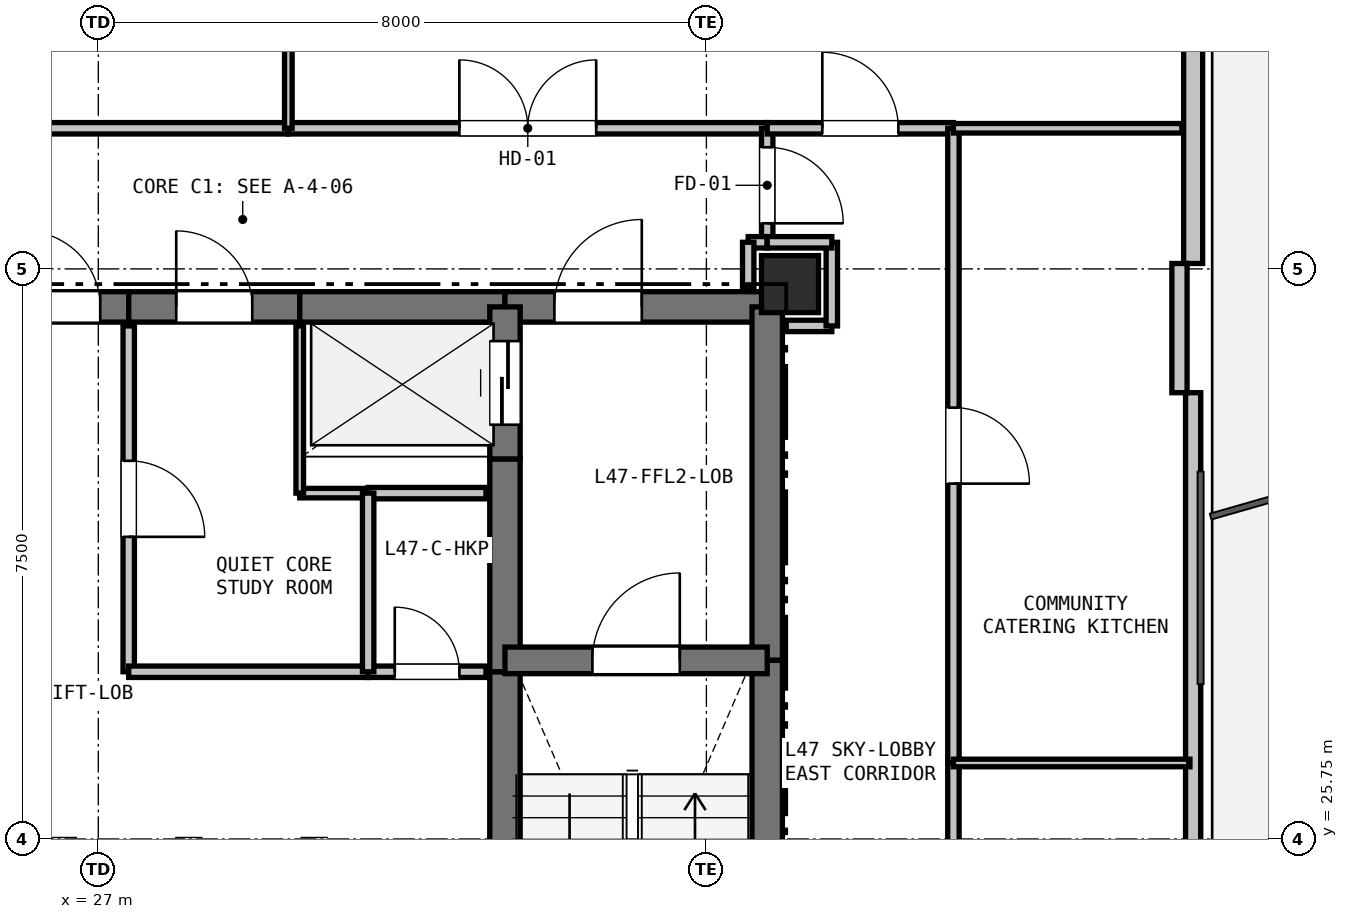
"""IFC4 building model, lengths in metres.
Left out: names, types, materials, properties, quantities, classifications, styles, units other than length and angle.
Written with IfcOpenShell. Run it as: python <this file> out.ifc"""

import sys

from ifc_helpers import new_model, si_unit, direction, frame, frame_2d, origin, origin_2d, place, context, subcontext, project, spatial, rectangle, extrude, element, fill, save


model = new_model("IFC4")
c1 = context("Model", 3, precision=1e-05, world=origin(), true_north=direction((0.0, 1.0)))
c2 = subcontext(c1, "Body", "Model", "MODEL_VIEW")
j1 = project(units=[si_unit("LENGTHUNIT", "METRE"), si_unit("PLANEANGLEUNIT", "RADIAN")], contexts=[c1])
p1 = place(None, origin())
s1 = spatial("IfcSite", under=j1, at=p1, CompositionType="ELEMENT")
p2 = place(p1, origin())
s2 = spatial("IfcBuilding", under=s1, at=p2, CompositionType="ELEMENT")
p3 = place(p2, frame((0.0, 0.0, 170.7)))
s3 = spatial("IfcBuildingStorey", under=s2, at=p3, CompositionType="ELEMENT", Elevation=170.7)
p4 = place(p3, frame((36.1, 33.05, 0.0), z_axis=(0.0, 0.0, 1.0), x_axis=(1.0, 0.0, 0.0)))
e1 = element("IfcColumn", 1, at=p4, inside=s3, PredefinedType="COLUMN", context=c2, shape_type="SweptSolid", body=[
    extrude(rectangle(XDim=0.75, YDim=0.75, at=origin_2d()), origin(), (0.0, 0.0, 1.0), 4.8),
])
p5 = place(p3, frame((18.58, 35.056, 0.0), z_axis=(0.0, 0.0, 1.0), x_axis=(0.866026169916, 0.499998673018, 0.0)))
e2 = element("IfcWall", 2, at=p5, inside=s3, PredefinedType="PARAPET", context=c2, shape_type="SweptSolid", body=[
    extrude(rectangle(XDim=9.742, YDim=0.2, at=frame_2d((4.871, 0.0))), origin(), (0.0, 0.0, 1.0), 0.2),
])
p6 = place(p3, frame((41.404, 43.764, 0.0), z_axis=(0.0, 0.0, 1.0), x_axis=(0.0, -1.0, 0.0)))
e3 = element("IfcWall", 3, at=p6, inside=s3, PredefinedType="SOLIDWALL", context=c2, shape_type="SweptSolid", body=[
    extrude(rectangle(XDim=10.442, YDim=0.25, at=frame_2d((5.221, 0.0))), origin(), (0.0, 0.0, 1.0), 3.205),
])
p7 = place(p6, frame((1.879, 0.0, 0.0)))
e4 = element("IfcOpeningElement", 4, at=p7, cuts=e3, PredefinedType="OPENING", context=c2, shape_type="SweptSolid", body=[
    extrude(rectangle(XDim=1.1, YDim=2.1, at=frame_2d((0.55, 1.05))), frame((0.0, 0.135, 0.0), z_axis=(0.0, -1.0, 0.0), x_axis=(1.0, 0.0, 0.0)), (0.0, 0.0, 1.0), 0.27),
])
p8 = place(p3, frame((41.404, 31.621, 0.0), z_axis=(0.0, 0.0, 1.0), x_axis=(0.0, -1.0, 0.0)))
e5 = element("IfcWall", 5, at=p8, inside=s3, PredefinedType="PARAPET", context=c2, shape_type="SweptSolid", body=[
    extrude(rectangle(XDim=9.742, YDim=0.2, at=frame_2d((4.871, 0.0))), origin(), (0.0, 0.0, 1.0), 0.2),
])
p9 = place(p3, frame((41.224, 33.321, 0.0), z_axis=(0.0, 0.0, 1.0), x_axis=(0.0, -1.0, 0.0)))
e6 = element("IfcWall", 6, at=p9, inside=s3, PredefinedType="PARAPET", context=c2, shape_type="SweptSolid", body=[
    extrude(rectangle(XDim=1.7, YDim=0.2, at=frame_2d((0.85, 0.0))), origin(), (0.0, 0.0, 1.0), 4.19),
])
p10 = place(p3, frame((25.65, 32.75, 0.0), z_axis=(0.0, 0.0, 1.0), x_axis=(1.0, 0.0, 0.0)))
e7 = element("IfcWall", 7, at=p10, inside=s3, PredefinedType="SHEAR", context=c2, shape_type="SweptSolid", body=[
    extrude(rectangle(XDim=1.75, YDim=0.4, at=frame_2d((0.875, 0.0))), origin(), (0.0, 0.0, 1.0), 4.57),
])
p11 = place(p10, frame((0.375, 0.0, 0.0)))
e8 = element("IfcOpeningElement", 8, at=p11, cuts=e7, PredefinedType="OPENING", context=c2, shape_type="SweptSolid", body=[
    extrude(rectangle(XDim=1.0, YDim=2.15, at=frame_2d((0.5, 1.075))), frame((0.0, 0.21, 0.0), z_axis=(0.0, -1.0, 0.0), x_axis=(1.0, 0.0, 0.0)), (0.0, 0.0, 1.0), 0.42),
])
p12 = place(p3, frame((27.4, 32.75, 0.0), z_axis=(0.0, 0.0, 1.0), x_axis=(1.0, 0.0, 0.0)))
e9 = element("IfcWall", 9, at=p12, inside=s3, PredefinedType="SHEAR", context=c2, shape_type="SweptSolid", body=[
    extrude(rectangle(XDim=2.25, YDim=0.4, at=frame_2d((1.125, 0.0))), origin(), (0.0, 0.0, 1.0), 4.57),
])
p13 = place(p12, frame((0.625, 0.0, 0.0)))
e10 = element("IfcOpeningElement", 10, at=p13, cuts=e9, PredefinedType="OPENING", context=c2, shape_type="SweptSolid", body=[
    extrude(rectangle(XDim=1.0, YDim=2.15, at=frame_2d((0.5, 1.075))), frame((0.0, 0.21, 0.0), z_axis=(0.0, -1.0, 0.0), x_axis=(1.0, 0.0, 0.0)), (0.0, 0.0, 1.0), 0.42),
])
p14 = place(p3, frame((29.65, 32.75, 0.0), z_axis=(0.0, 0.0, 1.0), x_axis=(1.0, 0.0, 0.0)))
e11 = element("IfcWall", 11, at=p14, inside=s3, PredefinedType="SHEAR", context=c2, shape_type="SweptSolid", body=[
    extrude(rectangle(XDim=2.7, YDim=0.4, at=frame_2d((1.35, 0.0))), origin(), (0.0, 0.0, 1.0), 4.57),
])
p15 = place(p3, frame((32.35, 32.75, 0.0), z_axis=(0.0, 0.0, 1.0), x_axis=(1.0, 0.0, 0.0)))
e12 = element("IfcWall", 12, at=p15, inside=s3, PredefinedType="SHEAR", context=c2, shape_type="SweptSolid", body=[
    extrude(rectangle(XDim=3.45, YDim=0.4, at=frame_2d((1.725, 0.0))), origin(), (0.0, 0.0, 1.0), 4.57),
])
p16 = place(p15, frame((0.65, 0.0, 0.0)))
e13 = element("IfcOpeningElement", 13, at=p16, cuts=e12, PredefinedType="OPENING", context=c2, shape_type="SweptSolid", body=[
    extrude(rectangle(XDim=1.15, YDim=2.15, at=frame_2d((0.575, 1.075))), frame((0.0, 0.21, 0.0), z_axis=(0.0, -1.0, 0.0), x_axis=(1.0, 0.0, 0.0)), (0.0, 0.0, 1.0), 0.42),
])
p17 = place(p3, frame((35.8, 32.75, 0.0), z_axis=(0.0, 0.0, 1.0), x_axis=(0.0, -1.0, 0.0)))
e14 = element("IfcWall", 14, at=p17, inside=s3, PredefinedType="SHEAR", context=c2, shape_type="SweptSolid", body=[
    extrude(rectangle(XDim=4.65, YDim=0.4, at=frame_2d((2.325, 0.0))), origin(), (0.0, 0.0, 1.0), 4.57),
])
p18 = place(p3, frame((35.8, 28.1, 0.0), z_axis=(0.0, 0.0, 1.0), x_axis=(0.0, -1.0, 0.0)))
e15 = element("IfcWall", 15, at=p18, inside=s3, PredefinedType="SHEAR", context=c2, shape_type="SweptSolid", body=[
    extrude(rectangle(XDim=7.35, YDim=0.4, at=frame_2d((3.675, 0.0))), origin(), (0.0, 0.0, 1.0), 4.57),
])
p19 = place(p3, frame((32.35, 25.55, 0.0), z_axis=(0.0, 0.0, 1.0), x_axis=(0.0, 1.0, 0.0)))
e16 = element("IfcWall", 16, at=p19, inside=s3, PredefinedType="SHEAR", context=c2, shape_type="SweptSolid", body=[
    extrude(rectangle(XDim=2.4, YDim=0.4, at=frame_2d((1.2, 0.0))), origin(), (0.0, 0.0, 1.0), 4.57),
])
p20 = place(p3, frame((32.35, 27.95, 0.0), z_axis=(0.0, 0.0, 1.0), x_axis=(0.0, 1.0, 0.0)))
e17 = element("IfcWall", 17, at=p20, inside=s3, PredefinedType="SHEAR", context=c2, shape_type="SweptSolid", body=[
    extrude(rectangle(XDim=2.8, YDim=0.4, at=frame_2d((1.4, 0.0))), origin(), (0.0, 0.0, 1.0), 4.57),
])
p21 = place(p3, frame((32.35, 30.75, 0.0), z_axis=(0.0, 0.0, 1.0), x_axis=(0.0, 1.0, 0.0)))
e18 = element("IfcWall", 18, at=p21, inside=s3, PredefinedType="SHEAR", context=c2, shape_type="SweptSolid", body=[
    extrude(rectangle(XDim=2.0, YDim=0.4, at=frame_2d((1.0, 0.0))), origin(), (0.0, 0.0, 1.0), 4.57),
])
p22 = place(p21, frame((0.45, 0.0, 0.0)))
e19 = element("IfcOpeningElement", 19, at=p22, cuts=e18, PredefinedType="OPENING", context=c2, shape_type="SweptSolid", body=[
    extrude(rectangle(XDim=1.1, YDim=2.15, at=frame_2d((0.55, 1.075))), frame((0.0, 0.21, 0.0), z_axis=(0.0, -1.0, 0.0), x_axis=(1.0, 0.0, 0.0)), (0.0, 0.0, 1.0), 0.42),
])
p23 = place(p3, frame((32.35, 28.1, 0.0), z_axis=(0.0, 0.0, 1.0), x_axis=(1.0, 0.0, 0.0)))
e20 = element("IfcWall", 20, at=p23, inside=s3, PredefinedType="SHEAR", context=c2, shape_type="SweptSolid", body=[
    extrude(rectangle(XDim=3.45, YDim=0.35, at=frame_2d((1.725, 0.0))), origin(), (0.0, 0.0, 1.0), 4.57),
])
p24 = place(p23, frame((1.15, 0.0, 0.0)))
e21 = element("IfcOpeningElement", 21, at=p24, cuts=e20, PredefinedType="OPENING", context=c2, shape_type="SweptSolid", body=[
    extrude(rectangle(XDim=1.15, YDim=2.15, at=frame_2d((0.575, 1.075))), frame((0.0, 0.185, 0.0), z_axis=(0.0, -1.0, 0.0), x_axis=(1.0, 0.0, 0.0)), (0.0, 0.0, 1.0), 0.37),
])
p25 = place(p3, frame((32.1, 30.3, 0.0), z_axis=(0.0, 0.0, 1.0), x_axis=(-1.0, 0.0, 0.0)))
e22 = element("IfcWall", 22, at=p25, inside=s3, PredefinedType="PARTITIONING", context=c2, shape_type="SweptSolid", body=[
    extrude(rectangle(XDim=1.55, YDim=0.15, at=frame_2d((0.775, 0.0))), origin(), (0.0, 0.0, 1.0), 4.57),
])
p26 = place(p3, frame((30.55, 30.3, 0.0), z_axis=(0.0, 0.0, 1.0), x_axis=(-1.0, 0.0, 0.0)))
e23 = element("IfcWall", 23, at=p26, inside=s3, PredefinedType="PARTITIONING", context=c2, shape_type="SweptSolid", body=[
    extrude(rectangle(XDim=0.9, YDim=0.125, at=frame_2d((0.45, 0.0))), origin(), (0.0, 0.0, 1.0), 4.57),
])
p27 = place(p3, frame((29.65, 30.3, 0.0), z_axis=(0.0, 0.0, 1.0), x_axis=(0.0, 1.0, 0.0)))
e24 = element("IfcWall", 24, at=p27, inside=s3, PredefinedType="PARTITIONING", context=c2, shape_type="SweptSolid", body=[
    extrude(rectangle(XDim=2.2, YDim=0.1, at=frame_2d((1.1, 0.0))), origin(), (0.0, 0.0, 1.0), 4.57),
])
p28 = place(p3, frame((27.4, 32.5, 0.0), z_axis=(0.0, 0.0, 1.0), x_axis=(0.0, -1.0, 0.0)))
e25 = element("IfcWall", 25, at=p28, inside=s3, PredefinedType="PARTITIONING", context=c2, shape_type="SweptSolid", body=[
    extrude(rectangle(XDim=4.55, YDim=0.15, at=frame_2d((2.275, 0.0))), origin(), (0.0, 0.0, 1.0), 4.57),
])
p29 = place(p28, frame((1.775, 0.0, 0.0)))
e26 = element("IfcOpeningElement", 26, at=p29, cuts=e25, PredefinedType="OPENING", context=c2, shape_type="SweptSolid", body=[
    extrude(rectangle(XDim=1.0, YDim=2.15, at=frame_2d((0.5, 1.075))), frame((0.0, 0.085, 0.0), z_axis=(0.0, -1.0, 0.0), x_axis=(1.0, 0.0, 0.0)), (0.0, 0.0, 1.0), 0.17),
])
p30 = place(p3, frame((27.4, 27.95, 0.0), z_axis=(0.0, 0.0, 1.0), x_axis=(1.0, 0.0, 0.0)))
e27 = element("IfcWall", 27, at=p30, inside=s3, PredefinedType="PARTITIONING", context=c2, shape_type="SweptSolid", body=[
    extrude(rectangle(XDim=3.15, YDim=0.15, at=frame_2d((1.575, 0.0))), origin(), (0.0, 0.0, 1.0), 4.57),
])
p31 = place(p3, frame((30.55, 27.95, 0.0), z_axis=(0.0, 0.0, 1.0), x_axis=(1.0, 0.0, 0.0)))
e28 = element("IfcWall", 28, at=p31, inside=s3, PredefinedType="PARTITIONING", context=c2, shape_type="SweptSolid", body=[
    extrude(rectangle(XDim=1.55, YDim=0.15, at=frame_2d((0.775, 0.0))), origin(), (0.0, 0.0, 1.0), 4.57),
])
p32 = place(p31, frame((0.35, 0.0, 0.0)))
e29 = element("IfcOpeningElement", 29, at=p32, cuts=e28, PredefinedType="OPENING", context=c2, shape_type="SweptSolid", body=[
    extrude(rectangle(XDim=0.85, YDim=2.1, at=frame_2d((0.425, 1.05))), frame((0.0, 0.085, 0.0), z_axis=(0.0, -1.0, 0.0), x_axis=(1.0, 0.0, 0.0)), (0.0, 0.0, 1.0), 0.17),
])
p33 = place(p3, frame((20.0, 35.1, 0.0), z_axis=(0.0, 0.0, 1.0), x_axis=(1.0, 0.0, 0.0)))
e30 = element("IfcWall", 30, at=p33, inside=s3, PredefinedType="PARTITIONING", context=c2, shape_type="SweptSolid", body=[
    extrude(rectangle(XDim=9.5, YDim=0.15, at=frame_2d((4.75, 0.0))), origin(), (0.0, 0.0, 1.0), 2.365),
])
p34 = place(p33, frame((3.85, 0.0, 0.0)))
e31 = element("IfcOpeningElement", 31, at=p34, cuts=e30, PredefinedType="OPENING", context=c2, shape_type="SweptSolid", body=[
    extrude(rectangle(XDim=1.8, YDim=2.2, at=frame_2d((0.9, 1.1))), frame((0.0, 0.085, 0.0), z_axis=(0.0, -1.0, 0.0), x_axis=(1.0, 0.0, 0.0)), (0.0, 0.0, 1.0), 0.17),
])
p35 = place(p3, frame((29.5, 35.1, 0.0), z_axis=(0.0, 0.0, 1.0), x_axis=(1.0, 0.0, 0.0)))
e32 = element("IfcWall", 32, at=p35, inside=s3, PredefinedType="PARTITIONING", context=c2, shape_type="SweptSolid", body=[
    extrude(rectangle(XDim=6.3, YDim=0.15, at=frame_2d((3.15, 0.0))), origin(), (0.0, 0.0, 1.0), 3.205),
])
p36 = place(p35, frame((2.25, 0.0, 0.0)))
e33 = element("IfcOpeningElement", 33, at=p36, cuts=e32, PredefinedType="OPENING", context=c2, shape_type="SweptSolid", body=[
    extrude(rectangle(XDim=1.8, YDim=2.2, at=frame_2d((0.9, 1.1))), frame((0.0, 0.085, 0.0), z_axis=(0.0, -1.0, 0.0), x_axis=(1.0, 0.0, 0.0)), (0.0, 0.0, 1.0), 0.17),
])
p37 = place(p3, frame((35.8, 35.1, 0.0), z_axis=(0.0, 0.0, 1.0), x_axis=(0.0, -1.0, 0.0)))
e34 = element("IfcWall", 34, at=p37, inside=s3, PredefinedType="PARTITIONING", context=c2, shape_type="SweptSolid", body=[
    extrude(rectangle(XDim=1.5, YDim=0.15, at=frame_2d((0.75, 0.0))), origin(), (0.0, 0.0, 1.0), 3.205),
])
p38 = place(p37, frame((0.25, 0.0, 0.0)))
e35 = element("IfcOpeningElement", 35, at=p38, cuts=e34, PredefinedType="OPENING", context=c2, shape_type="SweptSolid", body=[
    extrude(rectangle(XDim=1.0, YDim=2.15, at=frame_2d((0.5, 1.075))), frame((0.0, 0.085, 0.0), z_axis=(0.0, -1.0, 0.0), x_axis=(1.0, 0.0, 0.0)), (0.0, 0.0, 1.0), 0.17),
])
p39 = place(p3, frame((35.8, 33.6, 0.0), z_axis=(0.0, 0.0, 1.0), x_axis=(-1.0, 0.0, 0.0)))
e36 = element("IfcWall", 36, at=p39, inside=s3, PredefinedType="PARTITIONING", context=c2, shape_type="SweptSolid", body=[
    extrude(rectangle(XDim=0.25, YDim=0.15, at=frame_2d((0.125, 0.0))), origin(), (0.0, 0.0, 1.0), 3.205),
])
p40 = place(p3, frame((35.55, 33.6, 0.0), z_axis=(0.0, 0.0, 1.0), x_axis=(0.0, -1.0, 0.0)))
e37 = element("IfcWall", 37, at=p40, inside=s3, PredefinedType="PARTITIONING", context=c2, shape_type="SweptSolid", body=[
    extrude(rectangle(XDim=0.6, YDim=0.15, at=frame_2d((0.3, 0.0))), origin(), (0.0, 0.0, 1.0), 3.205),
])
p41 = place(p3, frame((36.05, 32.5, 0.0), z_axis=(0.0, 0.0, 1.0), x_axis=(1.0, 0.0, 0.0)))
e38 = element("IfcWall", 38, at=p41, inside=s3, PredefinedType="PARTITIONING", context=c2, shape_type="SweptSolid", body=[
    extrude(rectangle(XDim=0.6, YDim=0.15, at=frame_2d((0.3, 0.0))), origin(), (0.0, 0.0, 1.0), 4.095),
])
p42 = place(p3, frame((36.65, 32.5, 0.0), z_axis=(0.0, 0.0, 1.0), x_axis=(0.0, 1.0, 0.0)))
e39 = element("IfcWall", 39, at=p42, inside=s3, PredefinedType="PARTITIONING", context=c2, shape_type="SweptSolid", body=[
    extrude(rectangle(XDim=1.1, YDim=0.15, at=frame_2d((0.55, 0.0))), origin(), (0.0, 0.0, 1.0), 3.205),
])
p43 = place(p3, frame((36.65, 33.6, 0.0), z_axis=(0.0, 0.0, 1.0), x_axis=(-1.0, 0.0, 0.0)))
e40 = element("IfcWall", 40, at=p43, inside=s3, PredefinedType="PARTITIONING", context=c2, shape_type="SweptSolid", body=[
    extrude(rectangle(XDim=0.85, YDim=0.15, at=frame_2d((0.425, 0.0))), origin(), (0.0, 0.0, 1.0), 3.205),
])
p44 = place(p3, frame((35.8, 35.1, 0.0), z_axis=(0.0, 0.0, 1.0), x_axis=(1.0, 0.0, 0.0)))
e41 = element("IfcWall", 41, at=p44, inside=s3, PredefinedType="PARTITIONING", context=c2, shape_type="SweptSolid", body=[
    extrude(rectangle(XDim=2.45, YDim=0.15, at=frame_2d((1.225, 0.0))), origin(), (0.0, 0.0, 1.0), 3.205),
])
p45 = place(p44, frame((0.725, 0.0, 0.0)))
e42 = element("IfcOpeningElement", 42, at=p45, cuts=e41, PredefinedType="OPENING", context=c2, shape_type="SweptSolid", body=[
    extrude(rectangle(XDim=1.0, YDim=2.15, at=frame_2d((0.5, 1.075))), frame((0.0, 0.085, 0.0), z_axis=(0.0, -1.0, 0.0), x_axis=(1.0, 0.0, 0.0)), (0.0, 0.0, 1.0), 0.17),
])
p46 = place(p3, frame((38.25, 35.1, 0.0), z_axis=(0.0, 0.0, 1.0), x_axis=(0.0, -1.0, 0.0)))
e43 = element("IfcWall", 43, at=p46, inside=s3, PredefinedType="PARTITIONING", context=c2, shape_type="SweptSolid", body=[
    extrude(rectangle(XDim=8.35, YDim=0.15, at=frame_2d((4.175, 0.0))), origin(), (0.0, 0.0, 1.0), 3.205),
])
p47 = place(p46, frame((3.675, 0.0, 0.0)))
e44 = element("IfcOpeningElement", 44, at=p47, cuts=e43, PredefinedType="OPENING", context=c2, shape_type="SweptSolid", body=[
    extrude(rectangle(XDim=1.0, YDim=2.15, at=frame_2d((0.5, 1.075))), frame((0.0, 0.085, 0.0), z_axis=(0.0, -1.0, 0.0), x_axis=(1.0, 0.0, 0.0)), (0.0, 0.0, 1.0), 0.17),
])
p48 = place(p3, frame((38.25, 26.75, 0.0), z_axis=(0.0, 0.0, 1.0), x_axis=(0.0, -1.0, 0.0)))
e45 = element("IfcWall", 45, at=p48, inside=s3, PredefinedType="PARTITIONING", context=c2, shape_type="SweptSolid", body=[
    extrude(rectangle(XDim=8.35, YDim=0.15, at=frame_2d((4.175, 0.0))), origin(), (0.0, 0.0, 1.0), 4.57),
])
p49 = place(p48, frame((3.675, 0.0, 0.0)))
e46 = element("IfcOpeningElement", 46, at=p49, cuts=e45, PredefinedType="OPENING", context=c2, shape_type="SweptSolid", body=[
    extrude(rectangle(XDim=1.0, YDim=2.15, at=frame_2d((0.5, 1.075))), frame((0.0, 0.085, 0.0), z_axis=(0.0, -1.0, 0.0), x_axis=(1.0, 0.0, 0.0)), (0.0, 0.0, 1.0), 0.17),
])
p50 = place(p3, frame((38.25, 35.1, 0.0), z_axis=(0.0, 0.0, 1.0), x_axis=(1.0, 0.0, 0.0)))
e47 = element("IfcWall", 47, at=p50, inside=s3, PredefinedType="PARTITIONING", context=c2, shape_type="SweptSolid", body=[
    extrude(rectangle(XDim=3.005, YDim=0.125, at=frame_2d((1.502, 0.0))), origin(), (0.0, 0.0, 1.0), 2.365),
])
p51 = place(p3, frame((41.362, 26.75, 0.0), z_axis=(0.0, 0.0, 1.0), x_axis=(-1.0, 0.0, 0.0)))
e48 = element("IfcWall", 48, at=p51, inside=s3, PredefinedType="PARTITIONING", context=c2, shape_type="SweptSolid", body=[
    extrude(rectangle(XDim=3.112, YDim=0.1, at=frame_2d((1.556, 0.0))), origin(), (0.0, 0.0, 1.0), 2.365),
])
p52 = place(p3, frame((30.55, 30.3, 0.0), z_axis=(0.0, 0.0, 1.0), x_axis=(0.0, -1.0, 0.0)))
e49 = element("IfcWall", 49, at=p52, inside=s3, PredefinedType="PARTITIONING", context=c2, shape_type="SweptSolid", body=[
    extrude(rectangle(XDim=2.35, YDim=0.15, at=frame_2d((1.175, 0.0))), origin(), (0.0, 0.0, 1.0), 4.57),
])
p53 = place(p3, frame((29.5, 41.189, 0.0), z_axis=(0.0, 0.0, 1.0), x_axis=(0.0, -1.0, 0.0)))
e50 = element("IfcWall", 50, at=p53, inside=s3, PredefinedType="PARTITIONING", context=c2, shape_type="SweptSolid", body=[
    extrude(rectangle(XDim=6.089, YDim=0.1, at=frame_2d((3.044, 0.0))), origin(), (0.0, 0.0, 1.0), 2.365),
])
p54 = place(p11, origin())
e51 = element("IfcDoor", 51, at=p54, inside=s3, OperationType="SINGLE_SWING_LEFT", PredefinedType="DOOR", context=c2, shape_type="SweptSolid", body=[
    extrude(rectangle(XDim=1.0, YDim=2.15, at=frame_2d((0.5, 1.075))), frame((0.0, 0.025, 0.0), z_axis=(0.0, -1.0, 0.0), x_axis=(1.0, 0.0, 0.0)), (0.0, 0.0, 1.0), 0.05),
])
fill(e8, e51)
p55 = place(p22, origin())
e52 = element("IfcDoor", 52, at=p55, inside=s3, OperationType="SLIDING_TO_LEFT", PredefinedType="DOOR", context=c2, shape_type="SweptSolid", body=[
    extrude(rectangle(XDim=1.1, YDim=2.15, at=frame_2d((0.55, 1.075))), frame((0.0, 0.025, 0.0), z_axis=(0.0, -1.0, 0.0), x_axis=(1.0, 0.0, 0.0)), (0.0, 0.0, 1.0), 0.05),
])
fill(e19, e52)
p56 = place(p24, origin())
e53 = element("IfcDoor", 53, at=p56, inside=s3, OperationType="SINGLE_SWING_RIGHT", PredefinedType="DOOR", context=c2, shape_type="SweptSolid", body=[
    extrude(rectangle(XDim=1.15, YDim=2.15, at=frame_2d((0.575, 1.075))), frame((0.0, 0.025, 0.0), z_axis=(0.0, -1.0, 0.0), x_axis=(1.0, 0.0, 0.0)), (0.0, 0.0, 1.0), 0.05),
])
fill(e21, e53)
p57 = place(p16, origin())
e54 = element("IfcDoor", 54, at=p57, inside=s3, OperationType="SINGLE_SWING_RIGHT", PredefinedType="DOOR", context=c2, shape_type="SweptSolid", body=[
    extrude(rectangle(XDim=1.15, YDim=2.15, at=frame_2d((0.575, 1.075))), frame((0.0, 0.025, 0.0), z_axis=(0.0, -1.0, 0.0), x_axis=(1.0, 0.0, 0.0)), (0.0, 0.0, 1.0), 0.05),
])
fill(e13, e54)
p58 = place(p29, origin())
e55 = element("IfcDoor", 55, at=p58, inside=s3, OperationType="SINGLE_SWING_RIGHT", PredefinedType="DOOR", context=c2, shape_type="SweptSolid", body=[
    extrude(rectangle(XDim=1.0, YDim=2.15, at=frame_2d((0.5, 1.075))), frame((0.0, 0.025, 0.0), z_axis=(0.0, -1.0, 0.0), x_axis=(1.0, 0.0, 0.0)), (0.0, 0.0, 1.0), 0.05),
])
fill(e26, e55)
p59 = place(p32, origin())
e56 = element("IfcDoor", 56, at=p59, inside=s3, OperationType="SINGLE_SWING_LEFT", PredefinedType="DOOR", context=c2, shape_type="SweptSolid", body=[
    extrude(rectangle(XDim=0.85, YDim=2.1, at=frame_2d((0.425, 1.05))), frame((0.0, 0.025, 0.0), z_axis=(0.0, -1.0, 0.0), x_axis=(1.0, 0.0, 0.0)), (0.0, 0.0, 1.0), 0.05),
])
fill(e29, e56)
p60 = place(p38, origin())
e57 = element("IfcDoor", 57, at=p60, inside=s3, OperationType="SINGLE_SWING_RIGHT", PredefinedType="DOOR", context=c2, shape_type="SweptSolid", body=[
    extrude(rectangle(XDim=1.0, YDim=2.15, at=frame_2d((0.5, 1.075))), frame((0.0, 0.025, 0.0), z_axis=(0.0, -1.0, 0.0), x_axis=(1.0, 0.0, 0.0)), (0.0, 0.0, 1.0), 0.05),
])
fill(e35, e57)
p61 = place(p13, origin())
e58 = element("IfcDoor", 58, at=p61, inside=s3, OperationType="SINGLE_SWING_LEFT", PredefinedType="DOOR", context=c2, shape_type="SweptSolid", body=[
    extrude(rectangle(XDim=1.0, YDim=2.15, at=frame_2d((0.5, 1.075))), frame((0.0, 0.025, 0.0), z_axis=(0.0, -1.0, 0.0), x_axis=(1.0, 0.0, 0.0)), (0.0, 0.0, 1.0), 0.05),
])
fill(e10, e58)
p62 = place(p36, origin())
e59 = element("IfcDoor", 59, at=p62, inside=s3, OperationType="DOUBLE_DOOR_SINGLE_SWING", PredefinedType="DOOR", context=c2, shape_type="SweptSolid", body=[
    extrude(rectangle(XDim=1.8, YDim=2.2, at=frame_2d((0.9, 1.1))), frame((0.0, 0.025, 0.0), z_axis=(0.0, -1.0, 0.0), x_axis=(1.0, 0.0, 0.0)), (0.0, 0.0, 1.0), 0.05),
])
fill(e33, e59)
p63 = place(p47, origin())
e60 = element("IfcDoor", 60, at=p63, inside=s3, OperationType="SINGLE_SWING_RIGHT", PredefinedType="DOOR", context=c2, shape_type="SweptSolid", body=[
    extrude(rectangle(XDim=1.0, YDim=2.15, at=frame_2d((0.5, 1.075))), frame((0.0, 0.025, 0.0), z_axis=(0.0, -1.0, 0.0), x_axis=(1.0, 0.0, 0.0)), (0.0, 0.0, 1.0), 0.05),
])
fill(e44, e60)
p64 = place(p45, origin())
e61 = element("IfcDoor", 61, at=p64, inside=s3, OperationType="SINGLE_SWING_LEFT", PredefinedType="DOOR", context=c2, shape_type="SweptSolid", body=[
    extrude(rectangle(XDim=1.0, YDim=2.15, at=frame_2d((0.5, 1.075))), frame((0.0, 0.025, 0.0), z_axis=(0.0, -1.0, 0.0), x_axis=(1.0, 0.0, 0.0)), (0.0, 0.0, 1.0), 0.05),
])
fill(e42, e61)
save(model, sys.argv[1])
